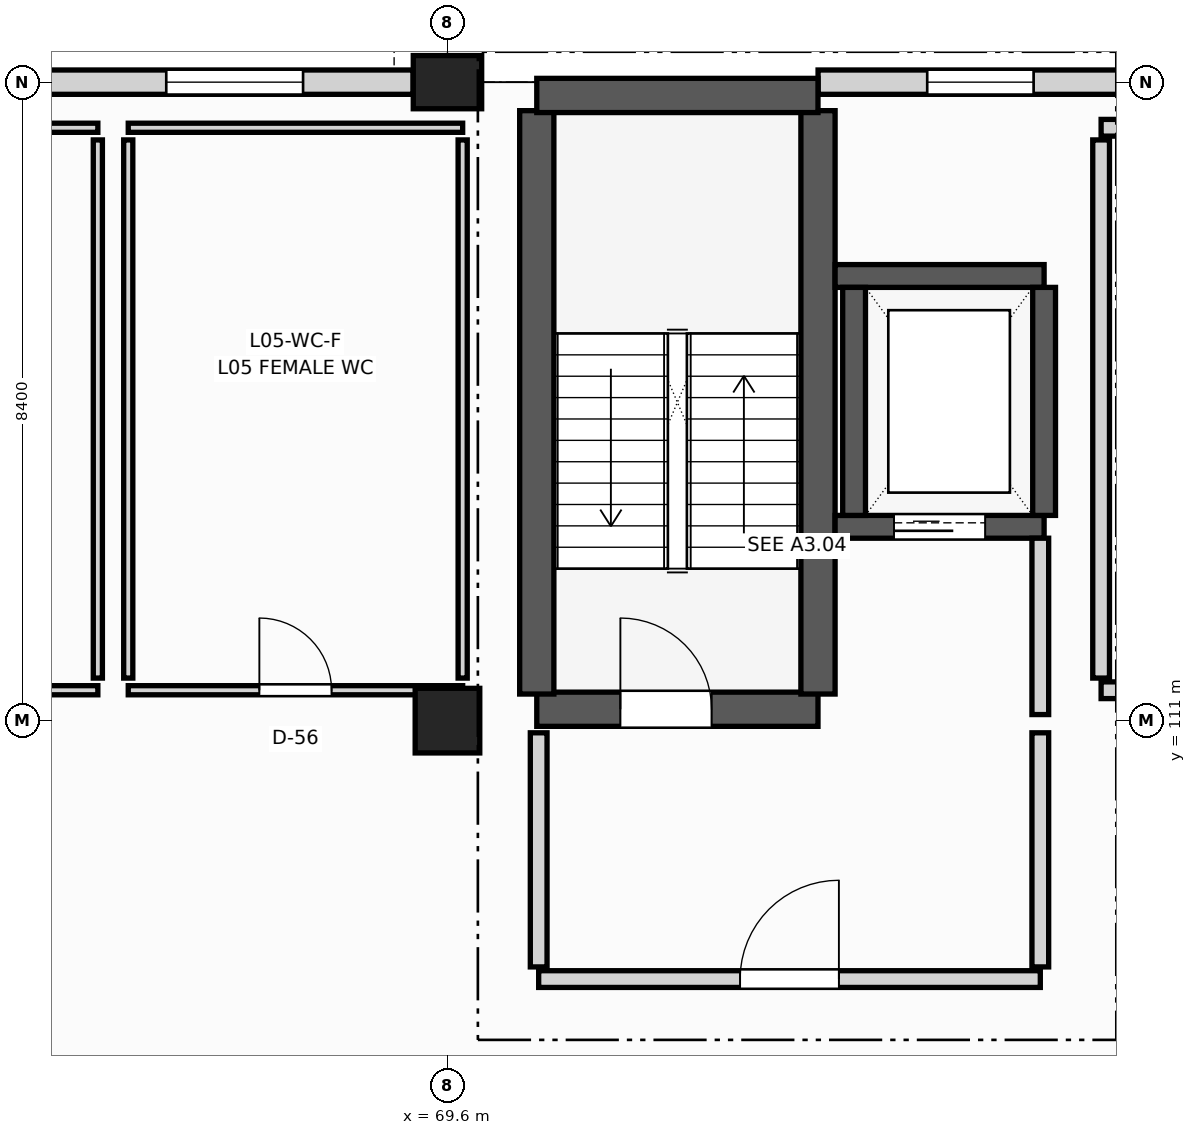
"""IFC4 building model, lengths in metres.
Left out: names, types, materials, properties, quantities, classifications, styles, units other than length and angle.
Written with IfcOpenShell. Run it as: python <this file> out.ifc"""

import sys

from ifc_helpers import new_model, si_unit, direction, frame, frame_2d, origin, origin_2d, place, context, subcontext, project, spatial, rectangle, extrude, element, fill, save


model = new_model("IFC4")
c1 = context("Model", 3, precision=1e-05, world=origin(), true_north=direction((0.0, 1.0)))
c2 = subcontext(c1, "Body", "Model", "MODEL_VIEW")
j1 = project(units=[si_unit("LENGTHUNIT", "METRE"), si_unit("PLANEANGLEUNIT", "RADIAN")], contexts=[c1])
p1 = place(None, origin())
s1 = spatial("IfcSite", under=j1, at=p1, CompositionType="ELEMENT")
p2 = place(p1, origin())
s2 = spatial("IfcBuilding", under=s1, at=p2, CompositionType="ELEMENT")
p3 = place(p2, frame((0.0, 0.0, 22.5)))
s3 = spatial("IfcBuildingStorey", under=s2, at=p3, CompositionType="ELEMENT", Elevation=22.5)
p4 = place(p3, frame((69.6, 111.0, 0.0), z_axis=(0.0, 0.0, 1.0), x_axis=(1.0, 0.0, 0.0)))
e1 = element("IfcColumn", 1, at=p4, inside=s3, PredefinedType="COLUMN", context=c2, shape_type="SweptSolid", body=[
    extrude(rectangle(XDim=0.85, YDim=0.85, at=origin_2d()), origin(), (0.0, 0.0, 1.0), 3.92),
])
p5 = place(p3, frame((69.6, 119.4, 0.0), z_axis=(0.0, 0.0, 1.0), x_axis=(1.0, 0.0, 0.0)))
e2 = element("IfcColumn", 2, at=p5, inside=s3, PredefinedType="COLUMN", context=c2, shape_type="SweptSolid", body=[
    extrude(rectangle(XDim=0.9, YDim=0.7, at=origin_2d()), origin(), (0.0, 0.0, 1.0), 3.92),
])
p6 = place(p3, frame((60.452, 119.4, 0.0), z_axis=(0.0, 0.0, 1.0), x_axis=(1.0, 0.0, 0.0)))
e3 = element("IfcWall", 3, at=p6, inside=s3, PredefinedType="SOLIDWALL", context=c2, shape_type="SweptSolid", body=[
    extrude(rectangle(XDim=8.696, YDim=0.32, at=frame_2d((4.348, 0.0))), origin(), (0.0, 0.0, 1.0), 3.08),
])
p7 = place(p6, frame((1.448, 0.0, 0.85)))
e4 = element("IfcOpeningElement", 4, at=p7, cuts=e3, PredefinedType="OPENING", context=c2, shape_type="SweptSolid", body=[
    extrude(rectangle(XDim=1.8, YDim=1.9, at=frame_2d((0.9, 0.95))), frame((0.0, 0.17, 0.0), z_axis=(0.0, -1.0, 0.0), x_axis=(1.0, 0.0, 0.0)), (0.0, 0.0, 1.0), 0.34),
])
p8 = place(p6, frame((5.448, 0.0, 0.85)))
e5 = element("IfcOpeningElement", 5, at=p8, cuts=e3, PredefinedType="OPENING", context=c2, shape_type="SweptSolid", body=[
    extrude(rectangle(XDim=1.8, YDim=1.9, at=frame_2d((0.9, 0.95))), frame((0.0, 0.17, 0.0), z_axis=(0.0, -1.0, 0.0), x_axis=(1.0, 0.0, 0.0)), (0.0, 0.0, 1.0), 0.34),
])
p9 = place(p3, frame((74.476, 119.4, 0.0), z_axis=(0.0, 0.0, 1.0), x_axis=(1.0, 0.0, 0.0)))
e6 = element("IfcWall", 6, at=p9, inside=s3, PredefinedType="SOLIDWALL", context=c2, shape_type="SweptSolid", body=[
    extrude(rectangle(XDim=4.272, YDim=0.32, at=frame_2d((2.136, 0.0))), origin(), (0.0, 0.0, 1.0), 3.08),
])
p10 = place(p9, frame((1.436, 0.0, 0.9)))
e7 = element("IfcOpeningElement", 7, at=p10, cuts=e6, PredefinedType="OPENING", context=c2, shape_type="SweptSolid", body=[
    extrude(rectangle(XDim=1.4, YDim=1.65, at=frame_2d((0.7, 0.825))), frame((0.0, 0.17, 0.0), z_axis=(0.0, -1.0, 0.0), x_axis=(1.0, 0.0, 0.0)), (0.0, 0.0, 1.0), 0.34),
])
p11 = place(p3, frame((70.775, 111.15, 0.0), z_axis=(0.0, 0.0, 1.0), x_axis=(1.0, 0.0, 0.0)))
e8 = element("IfcWall", 8, at=p11, inside=s3, PredefinedType="SHEAR", context=c2, shape_type="SweptSolid", body=[
    extrude(rectangle(XDim=3.7, YDim=0.45, at=frame_2d((1.85, 0.0))), origin(), (0.0, 0.0, 1.0), 3.92),
])
p12 = place(p11, frame((1.1, 0.0, 0.0)))
e9 = element("IfcOpeningElement", 9, at=p12, cuts=e8, PredefinedType="OPENING", context=c2, shape_type="SweptSolid", body=[
    extrude(rectangle(XDim=1.2, YDim=2.2, at=frame_2d((0.6, 1.1))), frame((0.0, 0.235, 0.0), z_axis=(0.0, -1.0, 0.0), x_axis=(1.0, 0.0, 0.0)), (0.0, 0.0, 1.0), 0.47),
])
for number, where, z_axis, x_axis in (
    (10, (70.775, 111.35, 0.0), (0.0, 0.0, 1.0), (0.0, 1.0, 0.0)),
    (11, (74.475, 111.35, 0.0), (0.0, 0.0, 1.0), (0.0, 1.0, 0.0)),
):
    element("IfcWall", number, at=place(p3, frame(where, z_axis=z_axis, x_axis=x_axis)), inside=s3, PredefinedType="SHEAR", context=c2, shape_type="SweptSolid", body=[
        extrude(rectangle(XDim=7.675, YDim=0.45, at=frame_2d((3.837, 0.0))), origin(), (0.0, 0.0, 1.0), 3.92),
    ])
p13 = place(p3, frame((70.775, 119.225, 0.0), z_axis=(0.0, 0.0, 1.0), x_axis=(1.0, 0.0, 0.0)))
e12 = element("IfcWall", 12, at=p13, inside=s3, PredefinedType="SHEAR", context=c2, shape_type="SweptSolid", body=[
    extrude(rectangle(XDim=3.7, YDim=0.45, at=frame_2d((1.85, 0.0))), origin(), (0.0, 0.0, 1.0), 3.92),
])
p14 = place(p3, frame((74.7, 113.55, 0.0), z_axis=(0.0, 0.0, 1.0), x_axis=(1.0, 0.0, 0.0)))
e13 = element("IfcWall", 13, at=p14, inside=s3, PredefinedType="SHEAR", context=c2, shape_type="SweptSolid", body=[
    extrude(rectangle(XDim=2.75, YDim=0.3, at=frame_2d((1.375, 0.0))), origin(), (0.0, 0.0, 1.0), 3.92),
])
p15 = place(p14, frame((0.775, 0.0, 0.0)))
e14 = element("IfcOpeningElement", 14, at=p15, cuts=e13, PredefinedType="OPENING", context=c2, shape_type="SweptSolid", body=[
    extrude(rectangle(XDim=1.2, YDim=2.2, at=frame_2d((0.6, 1.1))), frame((0.0, 0.16, 0.0), z_axis=(0.0, -1.0, 0.0), x_axis=(1.0, 0.0, 0.0)), (0.0, 0.0, 1.0), 0.32),
])
p16 = place(p3, frame((74.7, 116.85, 0.0), z_axis=(0.0, 0.0, 1.0), x_axis=(1.0, 0.0, 0.0)))
e15 = element("IfcWall", 15, at=p16, inside=s3, PredefinedType="SHEAR", context=c2, shape_type="SweptSolid", body=[
    extrude(rectangle(XDim=2.75, YDim=0.3, at=frame_2d((1.375, 0.0))), origin(), (0.0, 0.0, 1.0), 3.92),
])
for number, where, z_axis, x_axis in (
    (16, (74.95, 113.7, 0.0), (0.0, 0.0, 1.0), (0.0, 1.0, 0.0)),
    (17, (77.45, 113.7, 0.0), (0.0, 0.0, 1.0), (0.0, 1.0, 0.0)),
):
    element("IfcWall", number, at=place(p3, frame(where, z_axis=z_axis, x_axis=x_axis)), inside=s3, PredefinedType="SHEAR", context=c2, shape_type="SweptSolid", body=[
        extrude(rectangle(XDim=3.0, YDim=0.3, at=frame_2d((1.5, 0.0))), origin(), (0.0, 0.0, 1.0), 3.92),
    ])
p17 = place(p3, frame((70.8, 107.6, 0.0), z_axis=(0.0, 0.0, 1.0), x_axis=(1.0, 0.0, 0.0)))
e18 = element("IfcWall", 18, at=p17, inside=s3, PredefinedType="PARTITIONING", context=c2, shape_type="SweptSolid", body=[
    extrude(rectangle(XDim=6.6, YDim=0.22, at=frame_2d((3.3, 0.0))), origin(), (0.0, 0.0, 1.0), 3.15),
])
p18 = place(p17, frame((2.65, 0.0, 0.0)))
e19 = element("IfcOpeningElement", 19, at=p18, cuts=e18, PredefinedType="OPENING", context=c2, shape_type="SweptSolid", body=[
    extrude(rectangle(XDim=1.3, YDim=2.2, at=frame_2d((0.65, 1.1))), frame((0.0, 0.12, 0.0), z_axis=(0.0, -1.0, 0.0), x_axis=(1.0, 0.0, 0.0)), (0.0, 0.0, 1.0), 0.24),
])
p19 = place(p3, frame((77.4, 111.08, 0.0), z_axis=(0.0, 0.0, 1.0), x_axis=(0.0, 1.0, 0.0)))
e20 = element("IfcWall", 20, at=p19, inside=s3, PredefinedType="PARTITIONING", context=c2, shape_type="SweptSolid", body=[
    extrude(rectangle(XDim=2.32, YDim=0.22, at=frame_2d((1.16, 0.0))), origin(), (0.0, 0.0, 1.0), 3.15),
])
for number, where, z_axis, x_axis in (
    (21, (70.8, 107.76, 0.0), (0.0, 0.0, 1.0), (0.0, 1.0, 0.0)),
    (22, (77.4, 107.76, 0.0), (0.0, 0.0, 1.0), (0.0, 1.0, 0.0)),
):
    element("IfcWall", number, at=place(p3, frame(where, z_axis=z_axis, x_axis=x_axis)), inside=s3, PredefinedType="PARTITIONING", context=c2, shape_type="SweptSolid", body=[
        extrude(rectangle(XDim=3.08, YDim=0.22, at=frame_2d((1.54, 0.0))), origin(), (0.0, 0.0, 1.0), 3.15),
    ])
p20 = place(p3, frame((78.2, 111.4, 0.0), z_axis=(0.0, 0.0, 1.0), x_axis=(1.0, 0.0, 0.0)))
e23 = element("IfcWall", 23, at=p20, inside=s3, PredefinedType="PARTITIONING", context=c2, shape_type="SweptSolid", body=[
    extrude(rectangle(XDim=21.4, YDim=0.22, at=frame_2d((10.7, 0.0))), origin(), (0.0, 0.0, 1.0), 3.15),
])
p21 = place(p20, frame((6.69, 0.0, 0.0)))
e24 = element("IfcOpeningElement", 24, at=p21, cuts=e23, PredefinedType="OPENING", context=c2, shape_type="SweptSolid", body=[
    extrude(rectangle(XDim=1.6, YDim=2.3, at=frame_2d((0.8, 1.15))), frame((0.0, 0.12, 0.0), z_axis=(0.0, -1.0, 0.0), x_axis=(1.0, 0.0, 0.0)), (0.0, 0.0, 1.0), 0.24),
])
p22 = place(p3, frame((78.2, 118.8, 0.0), z_axis=(0.0, 0.0, 1.0), x_axis=(1.0, 0.0, 0.0)))
e25 = element("IfcWall", 25, at=p22, inside=s3, PredefinedType="PARTITIONING", context=c2, shape_type="SweptSolid", body=[
    extrude(rectangle(XDim=21.4, YDim=0.22, at=frame_2d((10.7, 0.0))), origin(), (0.0, 0.0, 1.0), 3.15),
])
p23 = place(p3, frame((78.2, 111.56, 0.0), z_axis=(0.0, 0.0, 1.0), x_axis=(0.0, 1.0, 0.0)))
e26 = element("IfcWall", 26, at=p23, inside=s3, PredefinedType="PARTITIONING", context=c2, shape_type="SweptSolid", body=[
    extrude(rectangle(XDim=7.08, YDim=0.22, at=frame_2d((3.54, 0.0))), origin(), (0.0, 0.0, 1.0), 3.15),
])
p24 = place(p3, frame((60.8, 111.4, 0.0), z_axis=(0.0, 0.0, 1.0), x_axis=(1.0, 0.0, 0.0)))
e27 = element("IfcWall", 27, at=p24, inside=s3, PredefinedType="PARTITIONING", context=c2, shape_type="SweptSolid", body=[
    extrude(rectangle(XDim=4.2, YDim=0.12, at=frame_2d((2.1, 0.0))), origin(), (0.0, 0.0, 1.0), 3.15),
])
p25 = place(p24, frame((1.625, 0.0, 0.0)))
e28 = element("IfcOpeningElement", 28, at=p25, cuts=e27, PredefinedType="OPENING", context=c2, shape_type="SweptSolid", body=[
    extrude(rectangle(XDim=0.95, YDim=2.1, at=frame_2d((0.475, 1.05))), frame((0.0, 0.07, 0.0), z_axis=(0.0, -1.0, 0.0), x_axis=(1.0, 0.0, 0.0)), (0.0, 0.0, 1.0), 0.14),
])
p26 = place(p3, frame((60.8, 118.8, 0.0), z_axis=(0.0, 0.0, 1.0), x_axis=(1.0, 0.0, 0.0)))
e29 = element("IfcWall", 29, at=p26, inside=s3, PredefinedType="PARTITIONING", context=c2, shape_type="SweptSolid", body=[
    extrude(rectangle(XDim=4.2, YDim=0.12, at=frame_2d((2.1, 0.0))), origin(), (0.0, 0.0, 1.0), 3.15),
])
p27 = place(p3, frame((65.0, 111.56, 0.0), z_axis=(0.0, 0.0, 1.0), x_axis=(0.0, 1.0, 0.0)))
e30 = element("IfcWall", 30, at=p27, inside=s3, PredefinedType="PARTITIONING", context=c2, shape_type="SweptSolid", body=[
    extrude(rectangle(XDim=7.08, YDim=0.12, at=frame_2d((3.54, 0.0))), origin(), (0.0, 0.0, 1.0), 3.15),
])
p28 = place(p3, frame((65.4, 111.4, 0.0), z_axis=(0.0, 0.0, 1.0), x_axis=(1.0, 0.0, 0.0)))
e31 = element("IfcWall", 31, at=p28, inside=s3, PredefinedType="PARTITIONING", context=c2, shape_type="SweptSolid", body=[
    extrude(rectangle(XDim=4.4, YDim=0.12, at=frame_2d((2.2, 0.0))), origin(), (0.0, 0.0, 1.0), 3.15),
])
p29 = place(p28, frame((1.725, 0.0, 0.0)))
e32 = element("IfcOpeningElement", 32, at=p29, cuts=e31, PredefinedType="OPENING", context=c2, shape_type="SweptSolid", body=[
    extrude(rectangle(XDim=0.95, YDim=2.1, at=frame_2d((0.475, 1.05))), frame((0.0, 0.07, 0.0), z_axis=(0.0, -1.0, 0.0), x_axis=(1.0, 0.0, 0.0)), (0.0, 0.0, 1.0), 0.14),
])
p30 = place(p3, frame((65.4, 118.8, 0.0), z_axis=(0.0, 0.0, 1.0), x_axis=(1.0, 0.0, 0.0)))
e33 = element("IfcWall", 33, at=p30, inside=s3, PredefinedType="PARTITIONING", context=c2, shape_type="SweptSolid", body=[
    extrude(rectangle(XDim=4.4, YDim=0.12, at=frame_2d((2.2, 0.0))), origin(), (0.0, 0.0, 1.0), 3.15),
])
for number, where, z_axis, x_axis in (
    (34, (65.4, 111.56, 0.0), (0.0, 0.0, 1.0), (0.0, 1.0, 0.0)),
    (35, (69.8, 111.56, 0.0), (0.0, 0.0, 1.0), (0.0, 1.0, 0.0)),
):
    element("IfcWall", number, at=place(p3, frame(where, z_axis=z_axis, x_axis=x_axis)), inside=s3, PredefinedType="PARTITIONING", context=c2, shape_type="SweptSolid", body=[
        extrude(rectangle(XDim=7.08, YDim=0.12, at=frame_2d((3.54, 0.0))), origin(), (0.0, 0.0, 1.0), 3.15),
    ])
p31 = place(p8, origin())
e36 = element("IfcWindow", 36, at=p31, inside=s3, PartitioningType="SINGLE_PANEL", PredefinedType="WINDOW", context=c2, shape_type="SweptSolid", body=[
    extrude(rectangle(XDim=1.8, YDim=1.9, at=frame_2d((0.9, 0.95))), frame((0.0, 0.03, 0.0), z_axis=(0.0, -1.0, 0.0), x_axis=(1.0, 0.0, 0.0)), (0.0, 0.0, 1.0), 0.06),
])
fill(e5, e36)
p32 = place(p10, origin())
e37 = element("IfcWindow", 37, at=p32, inside=s3, PartitioningType="SINGLE_PANEL", PredefinedType="WINDOW", context=c2, shape_type="SweptSolid", body=[
    extrude(rectangle(XDim=1.4, YDim=1.65, at=frame_2d((0.7, 0.825))), frame((0.0, 0.03, 0.0), z_axis=(0.0, -1.0, 0.0), x_axis=(1.0, 0.0, 0.0)), (0.0, 0.0, 1.0), 0.06),
])
fill(e7, e37)
p33 = place(p12, origin())
e38 = element("IfcDoor", 38, at=p33, inside=s3, OperationType="SINGLE_SWING_LEFT", PredefinedType="DOOR", context=c2, shape_type="SweptSolid", body=[
    extrude(rectangle(XDim=1.2, YDim=2.2, at=frame_2d((0.6, 1.1))), frame((0.0, 0.025, 0.0), z_axis=(0.0, -1.0, 0.0), x_axis=(1.0, 0.0, 0.0)), (0.0, 0.0, 1.0), 0.05),
])
fill(e9, e38)
p34 = place(p15, origin())
e39 = element("IfcDoor", 39, at=p34, inside=s3, OperationType="SLIDING_TO_LEFT", PredefinedType="DOOR", context=c2, shape_type="SweptSolid", body=[
    extrude(rectangle(XDim=1.2, YDim=2.2, at=frame_2d((0.6, 1.1))), frame((0.0, 0.025, 0.0), z_axis=(0.0, -1.0, 0.0), x_axis=(1.0, 0.0, 0.0)), (0.0, 0.0, 1.0), 0.05),
])
fill(e14, e39)
p35 = place(p18, origin())
e40 = element("IfcDoor", 40, at=p35, inside=s3, OperationType="SINGLE_SWING_RIGHT", PredefinedType="DOOR", context=c2, shape_type="SweptSolid", body=[
    extrude(rectangle(XDim=1.3, YDim=2.2, at=frame_2d((0.65, 1.1))), frame((0.0, 0.025, 0.0), z_axis=(0.0, -1.0, 0.0), x_axis=(1.0, 0.0, 0.0)), (0.0, 0.0, 1.0), 0.05),
])
fill(e19, e40)
p36 = place(p29, origin())
e41 = element("IfcDoor", 41, at=p36, inside=s3, OperationType="SINGLE_SWING_LEFT", PredefinedType="DOOR", context=c2, shape_type="SweptSolid", body=[
    extrude(rectangle(XDim=0.95, YDim=2.1, at=frame_2d((0.475, 1.05))), frame((0.0, 0.025, 0.0), z_axis=(0.0, -1.0, 0.0), x_axis=(1.0, 0.0, 0.0)), (0.0, 0.0, 1.0), 0.05),
])
fill(e32, e41)
save(model, sys.argv[1])
